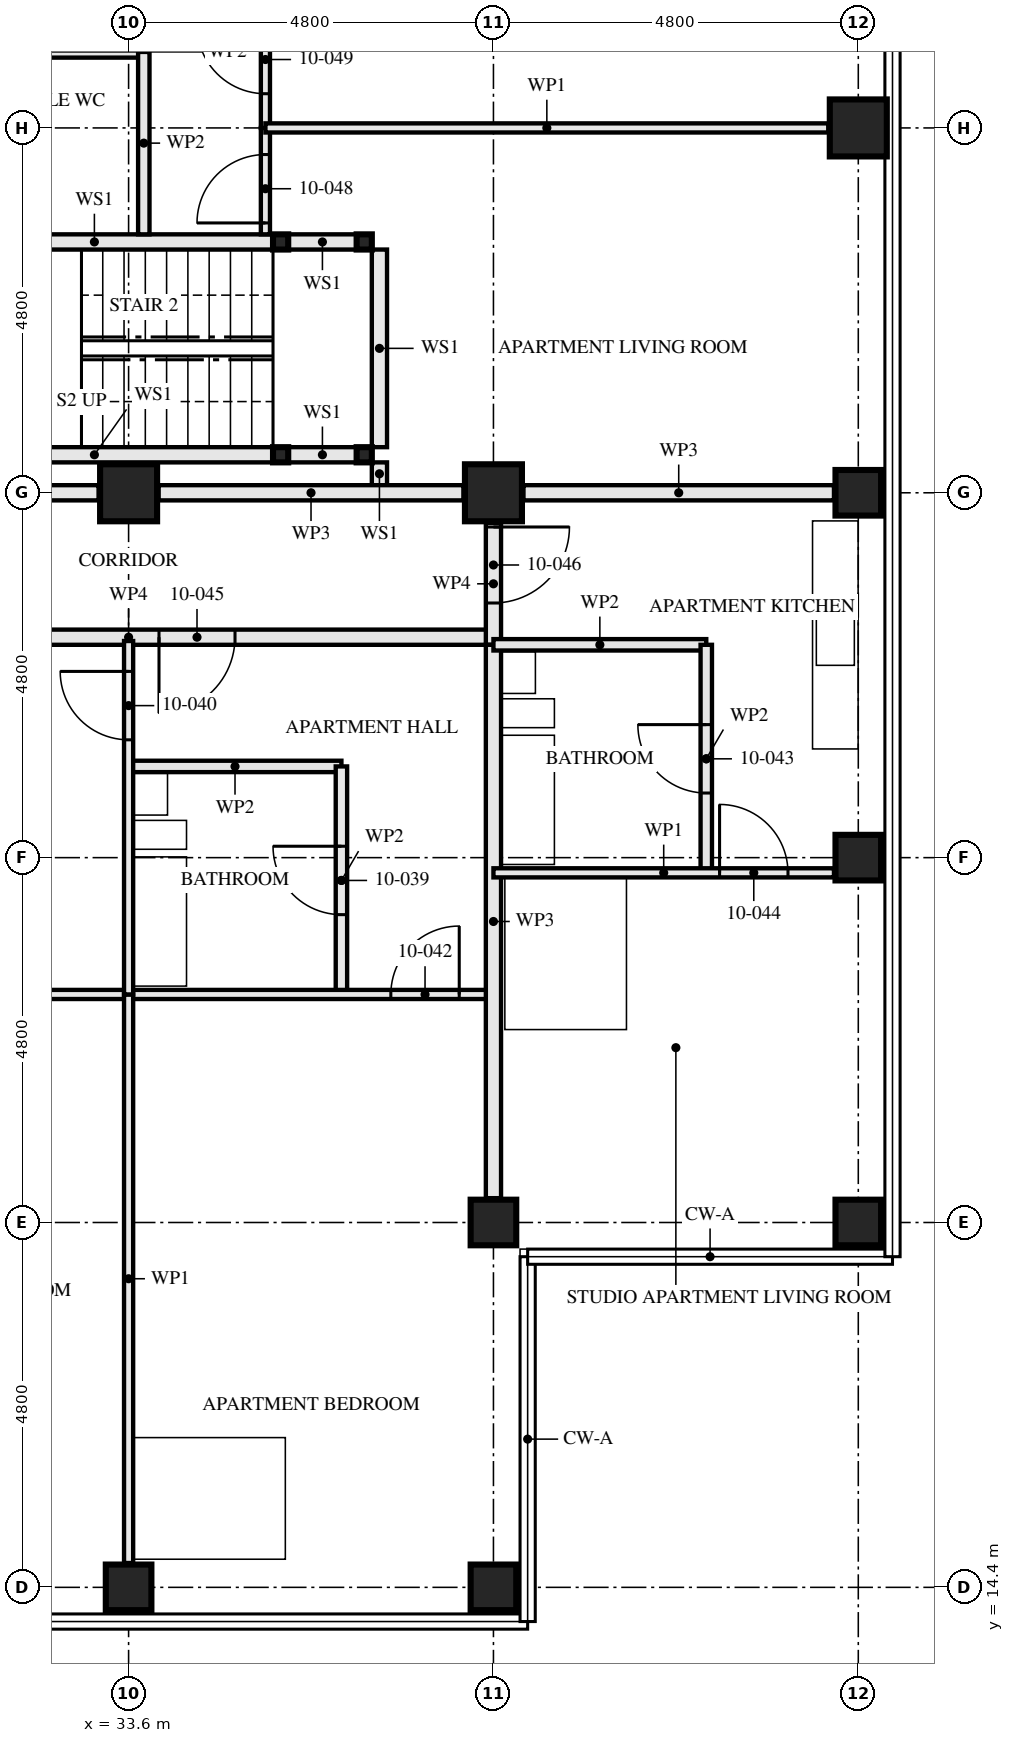
"""IFC4 building model, lengths in metres.
Left out: names, types, materials, properties, quantities, classifications, styles, units other than length and angle.
Written with IfcOpenShell. Run it as: python <this file> out.ifc"""

import sys

from ifc_helpers import new_model, si_unit, direction, frame, frame_2d, origin, origin_2d, place, context, subcontext, project, spatial, rectangle, hollow_rectangle, extrude, element, fill, save


model = new_model("IFC4")
c1 = context("Model", 3, precision=1e-05, world=origin(), true_north=direction((0.0, 1.0)))
c2 = subcontext(c1, "Body", "Model", "MODEL_VIEW")
j1 = project(units=[si_unit("LENGTHUNIT", "METRE"), si_unit("PLANEANGLEUNIT", "RADIAN")], contexts=[c1])
p1 = place(None, origin())
s1 = spatial("IfcSite", under=j1, at=p1, CompositionType="ELEMENT")
p2 = place(p1, origin())
s2 = spatial("IfcBuilding", under=s1, at=p2, CompositionType="ELEMENT")
p3 = place(p2, frame((0.0, 0.0, 41.0)))
s3 = spatial("IfcBuildingStorey", under=s2, at=p3, CompositionType="ELEMENT", Elevation=41.0)
p4 = place(p3, frame((33.6, 14.4, 0.0), z_axis=(0.0, 0.0, 1.0), x_axis=(0.0, 1.0, 0.0)))
e1 = element("IfcColumn", 1, at=p4, inside=s3, PredefinedType="COLUMN", context=c2, shape_type="SweptSolid", body=[
    extrude(hollow_rectangle(XDim=0.6, YDim=0.6, WallThickness=0.08, at=origin_2d()), origin(), (0.0, 0.0, 1.0), 3.5),
])
p5 = place(p3, frame((33.6, 28.8, 0.0), z_axis=(0.0, 0.0, 1.0), x_axis=(0.0, 1.0, 0.0)))
e2 = element("IfcColumn", 2, at=p5, inside=s3, PredefinedType="COLUMN", context=c2, shape_type="SweptSolid", body=[
    extrude(hollow_rectangle(XDim=0.75, YDim=0.75, WallThickness=0.08, at=origin_2d()), origin(), (0.0, 0.0, 1.0), 3.5),
])
for number, where, z_axis, x_axis in (
    (3, (38.4, 14.4, 0.0), (0.0, 0.0, 1.0), (0.0, 1.0, 0.0)),
    (4, (38.4, 19.2, 0.0), (0.0, 0.0, 1.0), (0.0, 1.0, 0.0)),
):
    element("IfcColumn", number, at=place(p3, frame(where, z_axis=z_axis, x_axis=x_axis)), inside=s3, PredefinedType="COLUMN", context=c2, shape_type="SweptSolid", body=[
        extrude(hollow_rectangle(XDim=0.6, YDim=0.6, WallThickness=0.06, at=origin_2d()), origin(), (0.0, 0.0, 1.0), 3.5),
    ])
p6 = place(p3, frame((38.4, 28.8, 0.0), z_axis=(0.0, 0.0, 1.0), x_axis=(0.0, 1.0, 0.0)))
e5 = element("IfcColumn", 5, at=p6, inside=s3, PredefinedType="COLUMN", context=c2, shape_type="SweptSolid", body=[
    extrude(hollow_rectangle(XDim=0.75, YDim=0.75, WallThickness=0.08, at=origin_2d()), origin(), (0.0, 0.0, 1.0), 3.5),
])
p7 = place(p3, frame((43.2, 19.2, 0.0), z_axis=(0.0, 0.0, 1.0), x_axis=(0.0, 1.0, 0.0)))
e6 = element("IfcColumn", 6, at=p7, inside=s3, PredefinedType="COLUMN", context=c2, shape_type="SweptSolid", body=[
    extrude(hollow_rectangle(XDim=0.6, YDim=0.6, WallThickness=0.06, at=origin_2d()), origin(), (0.0, 0.0, 1.0), 3.5),
])
for number, where, z_axis, x_axis in (
    (7, (43.2, 24.0, 0.0), (0.0, 0.0, 1.0), (1.0, 0.0, 0.0)),
    (8, (43.2, 28.8, 0.0), (0.0, 0.0, 1.0), (0.0, 1.0, 0.0)),
):
    element("IfcColumn", number, at=place(p3, frame(where, z_axis=z_axis, x_axis=x_axis)), inside=s3, PredefinedType="COLUMN", context=c2, shape_type="SweptSolid", body=[
        extrude(hollow_rectangle(XDim=0.6, YDim=0.6, WallThickness=0.08, at=origin_2d()), origin(), (0.0, 0.0, 1.0), 3.5),
    ])
p8 = place(p3, frame((43.2, 33.6, 0.0), z_axis=(0.0, 0.0, 1.0), x_axis=(1.0, 0.0, 0.0)))
e9 = element("IfcColumn", 9, at=p8, inside=s3, PredefinedType="COLUMN", context=c2, shape_type="SweptSolid", body=[
    extrude(hollow_rectangle(XDim=0.75, YDim=0.75, WallThickness=0.08, at=origin_2d()), origin(), (0.0, 0.0, 1.0), 3.5),
])
for number, where, z_axis, x_axis in (
    (10, (36.7, 29.3, 0.0), (0.0, 0.0, 1.0), (1.0, 0.0, 0.0)),
    (11, (36.7, 32.1, 0.0), (0.0, 0.0, 1.0), (1.0, 0.0, 0.0)),
    (12, (35.6, 29.3, 0.0), (0.0, 0.0, 1.0), (1.0, 0.0, 0.0)),
    (13, (35.6, 32.1, 0.0), (0.0, 0.0, 1.0), (1.0, 0.0, 0.0)),
):
    element("IfcColumn", number, at=place(p3, frame(where, z_axis=z_axis, x_axis=x_axis)), inside=s3, PredefinedType="COLUMN", context=c2, shape_type="SweptSolid", body=[
        extrude(hollow_rectangle(XDim=0.2, YDim=0.2, WallThickness=0.008, at=origin_2d()), origin(), (0.0, 0.0, 1.0), 3.33),
    ])
p9 = place(p3, frame((36.4, 22.2, 0.0), z_axis=(0.0, 0.0, 1.0), x_axis=(0.0, 1.0, 0.0)))
e14 = element("IfcWall", 14, at=p9, inside=s3, PredefinedType="PARTITIONING", context=c2, shape_type="SweptSolid", body=[
    extrude(rectangle(XDim=3.0, YDim=0.15, at=frame_2d((1.5, 0.0))), origin(), (0.0, 0.0, 1.0), 2.55),
])
p10 = place(p9, frame((1.05, 0.0, 0.0)))
e15 = element("IfcOpeningElement", 15, at=p10, cuts=e14, PredefinedType="OPENING", context=c2, shape_type="SweptSolid", body=[
    extrude(rectangle(XDim=0.9, YDim=2.1, at=frame_2d((0.45, 1.05))), frame((0.0, 0.085, 0.0), z_axis=(0.0, -1.0, 0.0), x_axis=(1.0, 0.0, 0.0)), (0.0, 0.0, 1.0), 0.171),
])
p11 = place(p3, frame((33.6, 25.2, 0.0), z_axis=(0.0, 0.0, 1.0), x_axis=(1.0, 0.0, 0.0)))
e16 = element("IfcWall", 16, at=p11, inside=s3, PredefinedType="PARTITIONING", context=c2, shape_type="SweptSolid", body=[
    extrude(rectangle(XDim=2.8, YDim=0.15, at=frame_2d((1.4, 0.0))), origin(), (0.0, 0.0, 1.0), 3.33),
])
p12 = place(p3, frame((33.6, 22.2, 0.0), z_axis=(0.0, 0.0, 1.0), x_axis=(0.0, 1.0, 0.0)))
e17 = element("IfcWall", 17, at=p12, inside=s3, PredefinedType="PARTITIONING", context=c2, shape_type="SweptSolid", body=[
    extrude(rectangle(XDim=4.65, YDim=0.12, at=frame_2d((2.325, 0.0))), origin(), (0.0, 0.0, 1.0), 2.55),
])
p13 = place(p12, frame((3.35, 0.0, 0.0)))
e18 = element("IfcOpeningElement", 18, at=p13, cuts=e17, PredefinedType="OPENING", context=c2, shape_type="SweptSolid", body=[
    extrude(rectangle(XDim=0.9, YDim=2.1, at=frame_2d((0.45, 1.05))), frame((0.0, 0.071, 0.0), z_axis=(0.0, -1.0, 0.0), x_axis=(1.0, 0.0, 0.0)), (0.0, 0.0, 1.0), 0.141),
])
p14 = place(p3, frame((28.8, 22.2, 0.0), z_axis=(0.0, 0.0, 1.0), x_axis=(1.0, 0.0, 0.0)))
e19 = element("IfcWall", 19, at=p14, inside=s3, PredefinedType="PARTITIONING", context=c2, shape_type="SweptSolid", body=[
    extrude(rectangle(XDim=4.8, YDim=0.12, at=frame_2d((2.4, 0.0))), origin(), (0.0, 0.0, 1.0), 3.33),
])
p15 = place(p14, frame((0.45, 0.0, 0.0)))
e20 = element("IfcOpeningElement", 20, at=p15, cuts=e19, PredefinedType="OPENING", context=c2, shape_type="SweptSolid", body=[
    extrude(rectangle(XDim=0.9, YDim=2.1, at=frame_2d((0.45, 1.05))), frame((0.0, 0.071, 0.0), z_axis=(0.0, -1.0, 0.0), x_axis=(1.0, 0.0, 0.0)), (0.0, 0.0, 1.0), 0.141),
])
p16 = place(p3, frame((33.6, 22.2, 0.0), z_axis=(0.0, 0.0, 1.0), x_axis=(1.0, 0.0, 0.0)))
e21 = element("IfcWall", 21, at=p16, inside=s3, PredefinedType="PARTITIONING", context=c2, shape_type="SweptSolid", body=[
    extrude(rectangle(XDim=4.8, YDim=0.12, at=frame_2d((2.4, 0.0))), origin(), (0.0, 0.0, 1.0), 3.33),
])
p17 = place(p16, frame((3.45, 0.0, 0.0)))
e22 = element("IfcOpeningElement", 22, at=p17, cuts=e21, PredefinedType="OPENING", context=c2, shape_type="SweptSolid", body=[
    extrude(rectangle(XDim=0.9, YDim=2.1, at=frame_2d((0.45, 1.05))), frame((0.0, 0.071, 0.0), z_axis=(0.0, -1.0, 0.0), x_axis=(1.0, 0.0, 0.0)), (0.0, 0.0, 1.0), 0.141),
])
p18 = place(p3, frame((33.6, 14.72, 0.0), z_axis=(0.0, 0.0, 1.0), x_axis=(0.0, 1.0, 0.0)))
e23 = element("IfcWall", 23, at=p18, inside=s3, PredefinedType="PARTITIONING", context=c2, shape_type="SweptSolid", body=[
    extrude(rectangle(XDim=7.48, YDim=0.12, at=frame_2d((3.74, 0.0))), origin(), (0.0, 0.0, 1.0), 2.55),
])
p19 = place(p3, frame((38.4, 19.52, 0.0), z_axis=(0.0, 0.0, 1.0), x_axis=(0.0, 1.0, 0.0)))
e24 = element("IfcWall", 24, at=p19, inside=s3, PredefinedType="PARTITIONING", context=c2, shape_type="SweptSolid", body=[
    extrude(rectangle(XDim=7.28, YDim=0.2, at=frame_2d((3.64, 0.0))), origin(), (0.0, 0.0, 1.0), 2.55),
])
p20 = place(p3, frame((41.2, 23.8, 0.0), z_axis=(0.0, 0.0, 1.0), x_axis=(0.0, 1.0, 0.0)))
e25 = element("IfcWall", 25, at=p20, inside=s3, PredefinedType="PARTITIONING", context=c2, shape_type="SweptSolid", body=[
    extrude(rectangle(XDim=3.0, YDim=0.15, at=frame_2d((1.5, 0.0))), origin(), (0.0, 0.0, 1.0), 2.55),
])
p21 = place(p20, frame((1.05, 0.0, 0.0)))
e26 = element("IfcOpeningElement", 26, at=p21, cuts=e25, PredefinedType="OPENING", context=c2, shape_type="SweptSolid", body=[
    extrude(rectangle(XDim=0.9, YDim=2.1, at=frame_2d((0.45, 1.05))), frame((0.0, 0.085, 0.0), z_axis=(0.0, -1.0, 0.0), x_axis=(1.0, 0.0, 0.0)), (0.0, 0.0, 1.0), 0.171),
])
p22 = place(p3, frame((38.4, 26.8, 0.0), z_axis=(0.0, 0.0, 1.0), x_axis=(1.0, 0.0, 0.0)))
e27 = element("IfcWall", 27, at=p22, inside=s3, PredefinedType="PARTITIONING", context=c2, shape_type="SweptSolid", body=[
    extrude(rectangle(XDim=2.8, YDim=0.15, at=frame_2d((1.4, 0.0))), origin(), (0.0, 0.0, 1.0), 3.33),
])
p23 = place(p3, frame((38.4, 23.8, 0.0), z_axis=(0.0, 0.0, 1.0), x_axis=(1.0, 0.0, 0.0)))
e28 = element("IfcWall", 28, at=p23, inside=s3, PredefinedType="PARTITIONING", context=c2, shape_type="SweptSolid", body=[
    extrude(rectangle(XDim=4.48, YDim=0.12, at=frame_2d((2.24, 0.0))), origin(), (0.0, 0.0, 1.0), 3.33),
])
p24 = place(p23, frame((2.975, 0.0, 0.0)))
e29 = element("IfcOpeningElement", 29, at=p24, cuts=e28, PredefinedType="OPENING", context=c2, shape_type="SweptSolid", body=[
    extrude(rectangle(XDim=0.9, YDim=2.1, at=frame_2d((0.45, 1.05))), frame((0.0, 0.071, 0.0), z_axis=(0.0, -1.0, 0.0), x_axis=(1.0, 0.0, 0.0)), (0.0, 0.0, 1.0), 0.141),
])
p25 = place(p3, frame((28.8, 26.9, 0.0), z_axis=(0.0, 0.0, 1.0), x_axis=(1.0, 0.0, 0.0)))
e30 = element("IfcWall", 30, at=p25, inside=s3, PredefinedType="PARTITIONING", context=c2, shape_type="SweptSolid", body=[
    extrude(rectangle(XDim=9.6, YDim=0.2, at=frame_2d((4.8, 0.0))), origin(), (0.0, 0.0, 1.0), 3.33),
])
p26 = place(p25, frame((5.2, 0.0, 0.0)))
e31 = element("IfcOpeningElement", 31, at=p26, cuts=e30, PredefinedType="OPENING", context=c2, shape_type="SweptSolid", body=[
    extrude(rectangle(XDim=1.0, YDim=2.1, at=frame_2d((0.5, 1.05))), frame((0.0, 0.111, 0.0), z_axis=(0.0, -1.0, 0.0), x_axis=(1.0, 0.0, 0.0)), (0.0, 0.0, 1.0), 0.221),
])
p27 = place(p3, frame((38.4, 26.8, 0.0), z_axis=(0.0, 0.0, 1.0), x_axis=(0.0, 1.0, 0.0)))
e32 = element("IfcWall", 32, at=p27, inside=s3, PredefinedType="PARTITIONING", context=c2, shape_type="SweptSolid", body=[
    extrude(rectangle(XDim=1.605, YDim=0.2, at=frame_2d((0.802, 0.0))), origin(), (0.0, 0.0, 1.0), 3.33),
])
p28 = place(p27, frame((0.55, 0.0, 0.0)))
e33 = element("IfcOpeningElement", 33, at=p28, cuts=e32, PredefinedType="OPENING", context=c2, shape_type="SweptSolid", body=[
    extrude(rectangle(XDim=1.0, YDim=2.1, at=frame_2d((0.5, 1.05))), frame((0.0, 0.111, 0.0), z_axis=(0.0, -1.0, 0.0), x_axis=(1.0, 0.0, 0.0)), (0.0, 0.0, 1.0), 0.221),
])
p29 = place(p3, frame((36.6, 29.3, 0.0), z_axis=(0.0, 0.0, 1.0), x_axis=(-1.0, 0.0, 0.0)))
e34 = element("IfcWall", 34, at=p29, inside=s3, PredefinedType="SOLIDWALL", context=c2, shape_type="SweptSolid", body=[
    extrude(rectangle(XDim=0.9, YDim=0.2, at=frame_2d((0.45, 0.0))), origin(), (0.0, 0.0, 1.0), 2.99),
])
p30 = place(p3, frame((35.5, 29.3, 0.0), z_axis=(0.0, 0.0, 1.0), x_axis=(-1.0, 0.0, 0.0)))
e35 = element("IfcWall", 35, at=p30, inside=s3, PredefinedType="SOLIDWALL", context=c2, shape_type="SweptSolid", body=[
    extrude(rectangle(XDim=4.7, YDim=0.2, at=frame_2d((2.35, 0.0))), origin(), (0.0, 0.0, 1.0), 2.99),
])
p31 = place(p3, frame((36.6, 32.1, 0.0), z_axis=(0.0, 0.0, 1.0), x_axis=(-1.0, 0.0, 0.0)))
e36 = element("IfcWall", 36, at=p31, inside=s3, PredefinedType="SOLIDWALL", context=c2, shape_type="SweptSolid", body=[
    extrude(rectangle(XDim=0.9, YDim=0.2, at=frame_2d((0.45, 0.0))), origin(), (0.0, 0.0, 1.0), 2.99),
])
p32 = place(p3, frame((35.5, 32.1, 0.0), z_axis=(0.0, 0.0, 1.0), x_axis=(-1.0, 0.0, 0.0)))
e37 = element("IfcWall", 37, at=p32, inside=s3, PredefinedType="SOLIDWALL", context=c2, shape_type="SweptSolid", body=[
    extrude(rectangle(XDim=4.7, YDim=0.2, at=frame_2d((2.35, 0.0))), origin(), (0.0, 0.0, 1.0), 2.99),
])
p33 = place(p3, frame((36.9, 28.9, 0.0), z_axis=(0.0, 0.0, 1.0), x_axis=(0.0, 1.0, 0.0)))
e38 = element("IfcWall", 38, at=p33, inside=s3, PredefinedType="SOLIDWALL", context=c2, shape_type="SweptSolid", body=[
    extrude(rectangle(XDim=0.3, YDim=0.2, at=frame_2d((0.15, 0.0))), origin(), (0.0, 0.0, 1.0), 3.33),
])
p34 = place(p3, frame((36.9, 29.4, 0.0), z_axis=(0.0, 0.0, 1.0), x_axis=(0.0, 1.0, 0.0)))
e39 = element("IfcWall", 39, at=p34, inside=s3, PredefinedType="SOLIDWALL", context=c2, shape_type="SweptSolid", body=[
    extrude(rectangle(XDim=2.6, YDim=0.2, at=frame_2d((1.3, 0.0))), origin(), (0.0, 0.0, 1.0), 3.33),
])
p35 = place(p3, frame((33.8, 32.2, 0.0), z_axis=(0.0, 0.0, 1.0), x_axis=(0.0, 1.0, 0.0)))
e40 = element("IfcWall", 40, at=p35, inside=s3, PredefinedType="PARTITIONING", context=c2, shape_type="SweptSolid", body=[
    extrude(rectangle(XDim=2.4, YDim=0.15, at=frame_2d((1.2, 0.0))), origin(), (0.0, 0.0, 1.0), 2.55),
])
p36 = place(p3, frame((33.8, 34.6, 0.0), z_axis=(0.0, 0.0, 1.0), x_axis=(-1.0, 0.0, 0.0)))
e41 = element("IfcWall", 41, at=p36, inside=s3, PredefinedType="PARTITIONING", context=c2, shape_type="SweptSolid", body=[
    extrude(rectangle(XDim=3.0, YDim=0.15, at=frame_2d((1.5, 0.0))), origin(), (0.0, 0.0, 1.0), 3.33),
])
p37 = place(p3, frame((35.4, 32.2, 0.0), z_axis=(0.0, 0.0, 1.0), x_axis=(0.0, 1.0, 0.0)))
e42 = element("IfcWall", 42, at=p37, inside=s3, PredefinedType="PARTITIONING", context=c2, shape_type="SweptSolid", body=[
    extrude(rectangle(XDim=1.4, YDim=0.12, at=frame_2d((0.7, 0.0))), origin(), (0.0, 0.0, 1.0), 3.33),
])
p38 = place(p37, frame((0.15, 0.0, 0.0)))
e43 = element("IfcOpeningElement", 43, at=p38, cuts=e42, PredefinedType="OPENING", context=c2, shape_type="SweptSolid", body=[
    extrude(rectangle(XDim=0.9, YDim=2.1, at=frame_2d((0.45, 1.05))), frame((0.0, 0.071, 0.0), z_axis=(0.0, -1.0, 0.0), x_axis=(1.0, 0.0, 0.0)), (0.0, 0.0, 1.0), 0.141),
])
p39 = place(p3, frame((35.4, 33.6, 0.0), z_axis=(0.0, 0.0, 1.0), x_axis=(0.0, 1.0, 0.0)))
e44 = element("IfcWall", 44, at=p39, inside=s3, PredefinedType="PARTITIONING", context=c2, shape_type="SweptSolid", body=[
    extrude(rectangle(XDim=4.8, YDim=0.12, at=frame_2d((2.4, 0.0))), origin(), (0.0, 0.0, 1.0), 3.33),
])
p40 = place(p39, frame((0.45, 0.0, 0.0)))
e45 = element("IfcOpeningElement", 45, at=p40, cuts=e44, PredefinedType="OPENING", context=c2, shape_type="SweptSolid", body=[
    extrude(rectangle(XDim=0.9, YDim=2.1, at=frame_2d((0.45, 1.05))), frame((0.0, 0.071, 0.0), z_axis=(0.0, -1.0, 0.0), x_axis=(1.0, 0.0, 0.0)), (0.0, 0.0, 1.0), 0.141),
])
p41 = place(p3, frame((42.805, 33.6, 0.0), z_axis=(0.0, 0.0, 1.0), x_axis=(-1.0, 0.0, 0.0)))
e46 = element("IfcWall", 46, at=p41, inside=s3, PredefinedType="PARTITIONING", context=c2, shape_type="SweptSolid", body=[
    extrude(rectangle(XDim=7.405, YDim=0.12, at=frame_2d((3.703, 0.0))), origin(), (0.0, 0.0, 1.0), 2.55),
])
p42 = place(p3, frame((42.88, 28.8, 0.0), z_axis=(0.0, 0.0, 1.0), x_axis=(-1.0, 0.0, 0.0)))
e47 = element("IfcWall", 47, at=p42, inside=s3, PredefinedType="PARTITIONING", context=c2, shape_type="SweptSolid", body=[
    extrude(rectangle(XDim=4.085, YDim=0.2, at=frame_2d((2.042, 0.0))), origin(), (0.0, 0.0, 1.0), 2.32),
])
p43 = place(p3, frame((38.005, 28.8, 0.0), z_axis=(0.0, 0.0, 1.0), x_axis=(-1.0, 0.0, 0.0)))
e48 = element("IfcWall", 48, at=p43, inside=s3, PredefinedType="PARTITIONING", context=c2, shape_type="SweptSolid", body=[
    extrude(rectangle(XDim=4.01, YDim=0.2, at=frame_2d((2.005, 0.0))), origin(), (0.0, 0.0, 1.0), 2.32),
])
p44 = place(p3, frame((33.205, 28.8, 0.0), z_axis=(0.0, 0.0, 1.0), x_axis=(-1.0, 0.0, 0.0)))
e49 = element("IfcWall", 49, at=p44, inside=s3, PredefinedType="PARTITIONING", context=c2, shape_type="SweptSolid", body=[
    extrude(rectangle(XDim=2.505, YDim=0.2, at=frame_2d((1.252, 0.0))), origin(), (0.0, 0.0, 1.0), 2.32),
])
p45 = place(p10, origin())
e50 = element("IfcDoor", 50, at=p45, inside=s3, OperationType="SINGLE_SWING_LEFT", PredefinedType="DOOR", context=c2, shape_type="SweptSolid", body=[
    extrude(rectangle(XDim=0.9, YDim=2.1, at=frame_2d((0.45, 1.05))), frame((0.0, 0.022, 0.0), z_axis=(0.0, -1.0, 0.0), x_axis=(1.0, 0.0, 0.0)), (0.0, 0.0, 1.0), 0.044),
])
fill(e15, e50)
p46 = place(p13, origin())
e51 = element("IfcDoor", 51, at=p46, inside=s3, OperationType="SINGLE_SWING_LEFT", PredefinedType="DOOR", context=c2, shape_type="SweptSolid", body=[
    extrude(rectangle(XDim=0.9, YDim=2.1, at=frame_2d((0.45, 1.05))), frame((0.0, 0.022, 0.0), z_axis=(0.0, -1.0, 0.0), x_axis=(1.0, 0.0, 0.0)), (0.0, 0.0, 1.0), 0.044),
])
fill(e18, e51)
p47 = place(p17, origin())
e52 = element("IfcDoor", 52, at=p47, inside=s3, OperationType="SINGLE_SWING_LEFT", PredefinedType="DOOR", context=c2, shape_type="SweptSolid", body=[
    extrude(rectangle(XDim=0.9, YDim=2.1, at=frame_2d((0.45, 1.05))), frame((0.0, 0.022, 0.0), z_axis=(0.0, -1.0, 0.0), x_axis=(1.0, 0.0, 0.0)), (0.0, 0.0, 1.0), 0.044),
])
fill(e22, e52)
p48 = place(p21, origin())
e53 = element("IfcDoor", 53, at=p48, inside=s3, OperationType="SINGLE_SWING_LEFT", PredefinedType="DOOR", context=c2, shape_type="SweptSolid", body=[
    extrude(rectangle(XDim=0.9, YDim=2.1, at=frame_2d((0.45, 1.05))), frame((0.0, 0.022, 0.0), z_axis=(0.0, -1.0, 0.0), x_axis=(1.0, 0.0, 0.0)), (0.0, 0.0, 1.0), 0.044),
])
fill(e26, e53)
p49 = place(p24, origin())
e54 = element("IfcDoor", 54, at=p49, inside=s3, OperationType="SINGLE_SWING_RIGHT", PredefinedType="DOOR", context=c2, shape_type="SweptSolid", body=[
    extrude(rectangle(XDim=0.9, YDim=2.1, at=frame_2d((0.45, 1.05))), frame((0.0, 0.022, 0.0), z_axis=(0.0, -1.0, 0.0), x_axis=(1.0, 0.0, 0.0)), (0.0, 0.0, 1.0), 0.044),
])
fill(e29, e54)
p50 = place(p26, frame((1.0, 0.0, 0.0), z_axis=(0.0, 0.0, 1.0), x_axis=(-1.0, 0.0, 0.0)))
e55 = element("IfcDoor", 55, at=p50, inside=s3, OperationType="SINGLE_SWING_LEFT", PredefinedType="DOOR", context=c2, shape_type="SweptSolid", body=[
    extrude(rectangle(XDim=1.0, YDim=2.1, at=frame_2d((0.5, 1.05))), frame((0.0, 0.027, 0.0), z_axis=(0.0, -1.0, 0.0), x_axis=(1.0, 0.0, 0.0)), (0.0, 0.0, 1.0), 0.054),
])
fill(e31, e55)
p51 = place(p28, frame((1.0, 0.0, 0.0), z_axis=(0.0, 0.0, 1.0), x_axis=(-1.0, 0.0, 0.0)))
e56 = element("IfcDoor", 56, at=p51, inside=s3, OperationType="SINGLE_SWING_RIGHT", PredefinedType="DOOR", context=c2, shape_type="SweptSolid", body=[
    extrude(rectangle(XDim=1.0, YDim=2.1, at=frame_2d((0.5, 1.05))), frame((0.0, 0.027, 0.0), z_axis=(0.0, -1.0, 0.0), x_axis=(1.0, 0.0, 0.0)), (0.0, 0.0, 1.0), 0.054),
])
fill(e33, e56)
p52 = place(p38, origin())
e57 = element("IfcDoor", 57, at=p52, inside=s3, OperationType="SINGLE_SWING_RIGHT", PredefinedType="DOOR", context=c2, shape_type="SweptSolid", body=[
    extrude(rectangle(XDim=0.9, YDim=2.1, at=frame_2d((0.45, 1.05))), frame((0.0, 0.022, 0.0), z_axis=(0.0, -1.0, 0.0), x_axis=(1.0, 0.0, 0.0)), (0.0, 0.0, 1.0), 0.044),
])
fill(e43, e57)
p53 = place(p40, origin())
e58 = element("IfcDoor", 58, at=p53, inside=s3, OperationType="SINGLE_SWING_LEFT", PredefinedType="DOOR", context=c2, shape_type="SweptSolid", body=[
    extrude(rectangle(XDim=0.9, YDim=2.1, at=frame_2d((0.45, 1.05))), frame((0.0, 0.022, 0.0), z_axis=(0.0, -1.0, 0.0), x_axis=(1.0, 0.0, 0.0)), (0.0, 0.0, 1.0), 0.044),
])
fill(e45, e58)
save(model, sys.argv[1])
